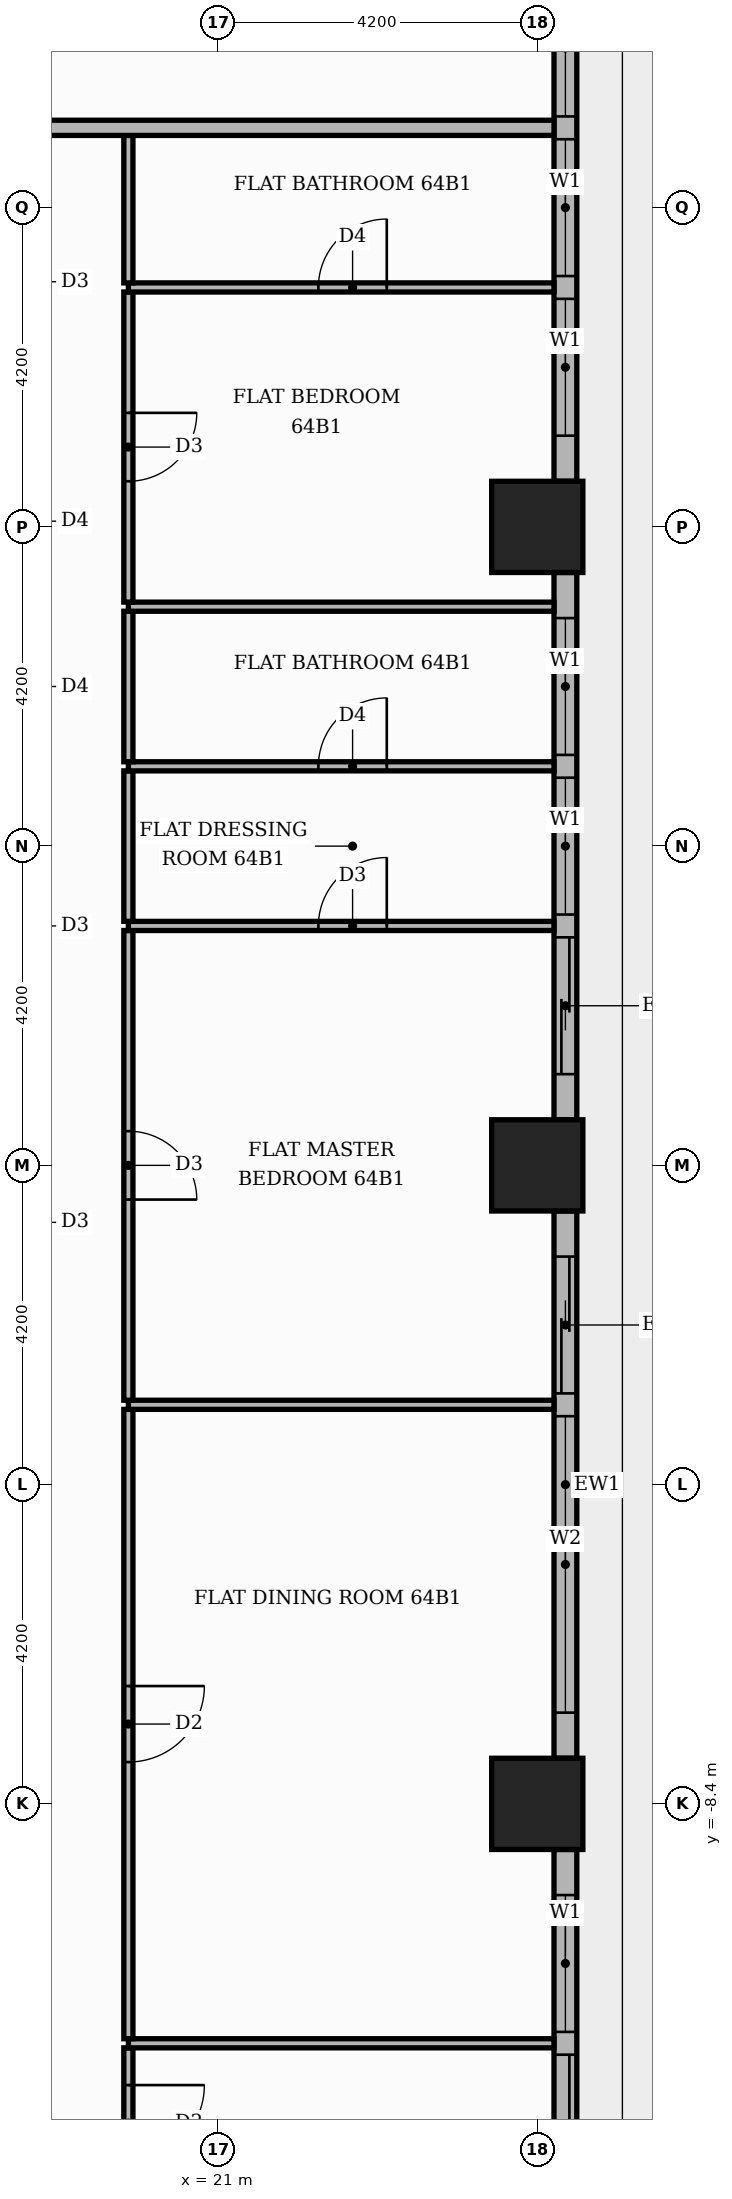
"""IFC4 building model, lengths in metres.
Left out: names, types, materials, properties, quantities, classifications, styles, units other than length and angle.
Written with IfcOpenShell. Run it as: python <this file> out.ifc"""

import sys

from ifc_helpers import new_model, si_unit, direction, frame, frame_2d, origin, origin_2d, place, context, subcontext, project, spatial, rectangle, extrude, element, fill, save


model = new_model("IFC4")
c1 = context("Model", 3, precision=1e-05, world=origin(), true_north=direction((0.0, 1.0)))
c2 = subcontext(c1, "Body", "Model", "MODEL_VIEW")
j1 = project(units=[si_unit("LENGTHUNIT", "METRE"), si_unit("PLANEANGLEUNIT", "RADIAN")], contexts=[c1])
p1 = place(None, origin())
s1 = spatial("IfcSite", under=j1, at=p1, CompositionType="ELEMENT")
p2 = place(p1, origin())
s2 = spatial("IfcBuilding", under=s1, at=p2, CompositionType="ELEMENT")
p3 = place(p2, frame((0.0, 0.0, 267.9)))
s3 = spatial("IfcBuildingStorey", under=s2, at=p3, CompositionType="ELEMENT", Elevation=267.9)
for number, where, z_axis, x_axis in (
    (1, (25.2, 0.0, 0.0), (0.0, 0.0, 1.0), (1.0, 0.0, 0.0)),
    (2, (25.2, 8.4, 0.0), (0.0, 0.0, 1.0), (1.0, 0.0, 0.0)),
    (3, (25.2, -8.4, 0.0), (0.0, 0.0, 1.0), (1.0, 0.0, 0.0)),
):
    element("IfcColumn", number, at=place(p3, frame(where, z_axis=z_axis, x_axis=x_axis)), inside=s3, PredefinedType="COLUMN", context=c2, shape_type="SweptSolid", body=[
        extrude(rectangle(XDim=1.2, YDim=1.2, at=origin_2d()), origin(), (0.0, 0.0, 1.0), 3.9),
    ])
p4 = place(p3, frame((25.57, -16.2, 0.0), z_axis=(0.0, 0.0, 1.0), x_axis=(0.0, 1.0, 0.0)))
e4 = element("IfcWall", 4, at=p4, inside=s3, PredefinedType="STANDARD", context=c2, shape_type="SweptSolid", body=[
    extrude(rectangle(XDim=7.2, YDim=0.3, at=frame_2d((3.6, 0.0))), origin(), (0.0, 0.0, 1.0), 3.48),
])
p5 = place(p4, frame((0.6, 0.0, 0.0)))
e5 = element("IfcOpeningElement", 5, at=p5, cuts=e4, PredefinedType="OPENING", context=c2, shape_type="SweptSolid", body=[
    extrude(rectangle(XDim=3.9, YDim=2.4, at=frame_2d((1.95, 1.2))), frame((0.0, 0.16, 0.0), z_axis=(0.0, -1.0, 0.0), x_axis=(1.0, 0.0, 0.0)), (0.0, 0.0, 1.0), 0.32),
])
p6 = place(p4, frame((4.8, 0.0, 0.9)))
e6 = element("IfcOpeningElement", 6, at=p6, cuts=e4, PredefinedType="OPENING", context=c2, shape_type="SweptSolid", body=[
    extrude(rectangle(XDim=1.8, YDim=2.1, at=frame_2d((0.9, 1.05))), frame((0.0, 0.16, 0.0), z_axis=(0.0, -1.0, 0.0), x_axis=(1.0, 0.0, 0.0)), (0.0, 0.0, 1.0), 0.32),
])
p7 = place(p3, frame((25.57, -7.8, 0.0), z_axis=(0.0, 0.0, 1.0), x_axis=(0.0, 1.0, 0.0)))
e7 = element("IfcWall", 7, at=p7, inside=s3, PredefinedType="STANDARD", context=c2, shape_type="SweptSolid", body=[
    extrude(rectangle(XDim=7.2, YDim=0.3, at=frame_2d((3.6, 0.0))), origin(), (0.0, 0.0, 1.0), 3.48),
])
p8 = place(p7, frame((0.6, 0.0, 0.9)))
e8 = element("IfcOpeningElement", 8, at=p8, cuts=e7, PredefinedType="OPENING", context=c2, shape_type="SweptSolid", body=[
    extrude(rectangle(XDim=3.9, YDim=2.1, at=frame_2d((1.95, 1.05))), frame((0.0, 0.16, 0.0), z_axis=(0.0, -1.0, 0.0), x_axis=(1.0, 0.0, 0.0)), (0.0, 0.0, 1.0), 0.32),
])
p9 = place(p7, frame((4.8, 0.0, 0.0)))
e9 = element("IfcOpeningElement", 9, at=p9, cuts=e7, PredefinedType="OPENING", context=c2, shape_type="SweptSolid", body=[
    extrude(rectangle(XDim=1.8, YDim=2.4, at=frame_2d((0.9, 1.2))), frame((0.0, 0.16, 0.0), z_axis=(0.0, -1.0, 0.0), x_axis=(1.0, 0.0, 0.0)), (0.0, 0.0, 1.0), 0.32),
])
p10 = place(p3, frame((25.57, 0.6, 0.0), z_axis=(0.0, 0.0, 1.0), x_axis=(0.0, 1.0, 0.0)))
e10 = element("IfcWall", 10, at=p10, inside=s3, PredefinedType="STANDARD", context=c2, shape_type="SweptSolid", body=[
    extrude(rectangle(XDim=7.2, YDim=0.3, at=frame_2d((3.6, 0.0))), origin(), (0.0, 0.0, 1.0), 3.48),
])
p11 = place(p10, frame((0.6, 0.0, 0.0)))
e11 = element("IfcOpeningElement", 11, at=p11, cuts=e10, PredefinedType="OPENING", context=c2, shape_type="SweptSolid", body=[
    extrude(rectangle(XDim=1.8, YDim=2.4, at=frame_2d((0.9, 1.2))), frame((0.0, 0.16, 0.0), z_axis=(0.0, -1.0, 0.0), x_axis=(1.0, 0.0, 0.0)), (0.0, 0.0, 1.0), 0.32),
])
p12 = place(p10, frame((2.7, 0.0, 0.9)))
e12 = element("IfcOpeningElement", 12, at=p12, cuts=e10, PredefinedType="OPENING", context=c2, shape_type="SweptSolid", body=[
    extrude(rectangle(XDim=1.8, YDim=2.1, at=frame_2d((0.9, 1.05))), frame((0.0, 0.16, 0.0), z_axis=(0.0, -1.0, 0.0), x_axis=(1.0, 0.0, 0.0)), (0.0, 0.0, 1.0), 0.32),
])
p13 = place(p10, frame((4.8, 0.0, 0.9)))
e13 = element("IfcOpeningElement", 13, at=p13, cuts=e10, PredefinedType="OPENING", context=c2, shape_type="SweptSolid", body=[
    extrude(rectangle(XDim=1.8, YDim=2.1, at=frame_2d((0.9, 1.05))), frame((0.0, 0.16, 0.0), z_axis=(0.0, -1.0, 0.0), x_axis=(1.0, 0.0, 0.0)), (0.0, 0.0, 1.0), 0.32),
])
p14 = place(p3, frame((25.57, 9.0, 0.0), z_axis=(0.0, 0.0, 1.0), x_axis=(0.0, 1.0, 0.0)))
e14 = element("IfcWall", 14, at=p14, inside=s3, PredefinedType="STANDARD", context=c2, shape_type="SweptSolid", body=[
    extrude(rectangle(XDim=7.2, YDim=0.3, at=frame_2d((3.6, 0.0))), origin(), (0.0, 0.0, 1.0), 3.48),
])
p15 = place(p14, frame((0.6, 0.0, 0.9)))
e15 = element("IfcOpeningElement", 15, at=p15, cuts=e14, PredefinedType="OPENING", context=c2, shape_type="SweptSolid", body=[
    extrude(rectangle(XDim=1.8, YDim=2.1, at=frame_2d((0.9, 1.05))), frame((0.0, 0.16, 0.0), z_axis=(0.0, -1.0, 0.0), x_axis=(1.0, 0.0, 0.0)), (0.0, 0.0, 1.0), 0.32),
])
p16 = place(p14, frame((2.7, 0.0, 0.9)))
e16 = element("IfcOpeningElement", 16, at=p16, cuts=e14, PredefinedType="OPENING", context=c2, shape_type="SweptSolid", body=[
    extrude(rectangle(XDim=1.8, YDim=2.1, at=frame_2d((0.9, 1.05))), frame((0.0, 0.16, 0.0), z_axis=(0.0, -1.0, 0.0), x_axis=(1.0, 0.0, 0.0)), (0.0, 0.0, 1.0), 0.32),
])
p17 = place(p14, frame((4.8, 0.0, 0.9)))
e17 = element("IfcOpeningElement", 17, at=p17, cuts=e14, PredefinedType="OPENING", context=c2, shape_type="SweptSolid", body=[
    extrude(rectangle(XDim=1.8, YDim=2.1, at=frame_2d((0.9, 1.05))), frame((0.0, 0.16, 0.0), z_axis=(0.0, -1.0, 0.0), x_axis=(1.0, 0.0, 0.0)), (0.0, 0.0, 1.0), 0.32),
])
p18 = place(p3, frame((19.82, -13.59, 0.0), z_axis=(0.0, 0.0, 1.0), x_axis=(0.0, 1.0, 0.0)))
e18 = element("IfcWall", 18, at=p18, inside=s3, PredefinedType="PARTITIONING", context=c2, shape_type="SweptSolid", body=[
    extrude(rectangle(XDim=1.98, YDim=0.12, at=frame_2d((0.99, 0.0))), origin(), (0.0, 0.0, 1.0), 3.48),
])
p19 = place(p18, frame((0.49, 0.0, 0.0)))
e19 = element("IfcOpeningElement", 19, at=p19, cuts=e18, PredefinedType="OPENING", context=c2, shape_type="SweptSolid", body=[
    extrude(rectangle(XDim=1.0, YDim=2.1, at=frame_2d((0.5, 1.05))), frame((0.0, 0.07, 0.0), z_axis=(0.0, -1.0, 0.0), x_axis=(1.0, 0.0, 0.0)), (0.0, 0.0, 1.0), 0.14),
])
p20 = place(p3, frame((19.82, -11.55, 0.0), z_axis=(0.0, 0.0, 1.0), x_axis=(1.0, 0.0, 0.0)))
e20 = element("IfcWall", 20, at=p20, inside=s3, PredefinedType="PARTITIONING", context=c2, shape_type="SweptSolid", body=[
    extrude(rectangle(XDim=5.6, YDim=0.12, at=frame_2d((2.8, 0.0))), origin(), (0.0, 0.0, 1.0), 3.48),
])
p21 = place(p3, frame((19.82, -11.49, 0.0), z_axis=(0.0, 0.0, 1.0), x_axis=(0.0, 1.0, 0.0)))
e21 = element("IfcWall", 21, at=p21, inside=s3, PredefinedType="PARTITIONING", context=c2, shape_type="SweptSolid", body=[
    extrude(rectangle(XDim=8.28, YDim=0.12, at=frame_2d((4.14, 0.0))), origin(), (0.0, 0.0, 1.0), 3.48),
])
p22 = place(p21, frame((3.64, 0.0, 0.0)))
e22 = element("IfcOpeningElement", 22, at=p22, cuts=e21, PredefinedType="OPENING", context=c2, shape_type="SweptSolid", body=[
    extrude(rectangle(XDim=1.0, YDim=2.1, at=frame_2d((0.5, 1.05))), frame((0.0, 0.07, 0.0), z_axis=(0.0, -1.0, 0.0), x_axis=(1.0, 0.0, 0.0)), (0.0, 0.0, 1.0), 0.14),
])
p23 = place(p3, frame((19.82, -3.15, 0.0), z_axis=(0.0, 0.0, 1.0), x_axis=(1.0, 0.0, 0.0)))
e23 = element("IfcWall", 23, at=p23, inside=s3, PredefinedType="PARTITIONING", context=c2, shape_type="SweptSolid", body=[
    extrude(rectangle(XDim=5.6, YDim=0.12, at=frame_2d((2.8, 0.0))), origin(), (0.0, 0.0, 1.0), 3.48),
])
p24 = place(p3, frame((19.82, -3.09, 0.0), z_axis=(0.0, 0.0, 1.0), x_axis=(0.0, 1.0, 0.0)))
e24 = element("IfcWall", 24, at=p24, inside=s3, PredefinedType="PARTITIONING", context=c2, shape_type="SweptSolid", body=[
    extrude(rectangle(XDim=6.18, YDim=0.12, at=frame_2d((3.09, 0.0))), origin(), (0.0, 0.0, 1.0), 3.48),
])
p25 = place(p24, frame((2.64, 0.0, 0.0)))
e25 = element("IfcOpeningElement", 25, at=p25, cuts=e24, PredefinedType="OPENING", context=c2, shape_type="SweptSolid", body=[
    extrude(rectangle(XDim=0.9, YDim=2.1, at=frame_2d((0.45, 1.05))), frame((0.0, 0.07, 0.0), z_axis=(0.0, -1.0, 0.0), x_axis=(1.0, 0.0, 0.0)), (0.0, 0.0, 1.0), 0.14),
])
p26 = place(p3, frame((19.82, 3.15, 0.0), z_axis=(0.0, 0.0, 1.0), x_axis=(1.0, 0.0, 0.0)))
e26 = element("IfcWall", 26, at=p26, inside=s3, PredefinedType="PARTITIONING", context=c2, shape_type="SweptSolid", body=[
    extrude(rectangle(XDim=5.6, YDim=0.12, at=frame_2d((2.8, 0.0))), origin(), (0.0, 0.0, 1.0), 3.48),
])
p27 = place(p26, frame((2.5, 0.0, 0.0)))
e27 = element("IfcOpeningElement", 27, at=p27, cuts=e26, PredefinedType="OPENING", context=c2, shape_type="SweptSolid", body=[
    extrude(rectangle(XDim=0.9, YDim=2.1, at=frame_2d((0.45, 1.05))), frame((0.0, 0.07, 0.0), z_axis=(0.0, -1.0, 0.0), x_axis=(1.0, 0.0, 0.0)), (0.0, 0.0, 1.0), 0.14),
])
p28 = place(p3, frame((19.82, 3.21, 0.0), z_axis=(0.0, 0.0, 1.0), x_axis=(0.0, 1.0, 0.0)))
e28 = element("IfcWall", 28, at=p28, inside=s3, PredefinedType="PARTITIONING", context=c2, shape_type="SweptSolid", body=[
    extrude(rectangle(XDim=1.98, YDim=0.12, at=frame_2d((0.99, 0.0))), origin(), (0.0, 0.0, 1.0), 3.48),
])
p29 = place(p3, frame((19.82, 5.25, 0.0), z_axis=(0.0, 0.0, 1.0), x_axis=(1.0, 0.0, 0.0)))
e29 = element("IfcWall", 29, at=p29, inside=s3, PredefinedType="PARTITIONING", context=c2, shape_type="SweptSolid", body=[
    extrude(rectangle(XDim=5.6, YDim=0.12, at=frame_2d((2.8, 0.0))), origin(), (0.0, 0.0, 1.0), 3.48),
])
p30 = place(p29, frame((2.5, 0.0, 0.0)))
e30 = element("IfcOpeningElement", 30, at=p30, cuts=e29, PredefinedType="OPENING", context=c2, shape_type="SweptSolid", body=[
    extrude(rectangle(XDim=0.9, YDim=2.1, at=frame_2d((0.45, 1.05))), frame((0.0, 0.07, 0.0), z_axis=(0.0, -1.0, 0.0), x_axis=(1.0, 0.0, 0.0)), (0.0, 0.0, 1.0), 0.14),
])
p31 = place(p3, frame((19.82, 5.31, 0.0), z_axis=(0.0, 0.0, 1.0), x_axis=(0.0, 1.0, 0.0)))
e31 = element("IfcWall", 31, at=p31, inside=s3, PredefinedType="PARTITIONING", context=c2, shape_type="SweptSolid", body=[
    extrude(rectangle(XDim=1.98, YDim=0.12, at=frame_2d((0.99, 0.0))), origin(), (0.0, 0.0, 1.0), 3.48),
])
p32 = place(p3, frame((19.82, 7.35, 0.0), z_axis=(0.0, 0.0, 1.0), x_axis=(1.0, 0.0, 0.0)))
e32 = element("IfcWall", 32, at=p32, inside=s3, PredefinedType="PARTITIONING", context=c2, shape_type="SweptSolid", body=[
    extrude(rectangle(XDim=5.6, YDim=0.12, at=frame_2d((2.8, 0.0))), origin(), (0.0, 0.0, 1.0), 3.48),
])
p33 = place(p3, frame((19.82, 7.41, 0.0), z_axis=(0.0, 0.0, 1.0), x_axis=(0.0, 1.0, 0.0)))
e33 = element("IfcWall", 33, at=p33, inside=s3, PredefinedType="PARTITIONING", context=c2, shape_type="SweptSolid", body=[
    extrude(rectangle(XDim=4.08, YDim=0.12, at=frame_2d((2.04, 0.0))), origin(), (0.0, 0.0, 1.0), 3.48),
])
p34 = place(p33, frame((1.59, 0.0, 0.0)))
e34 = element("IfcOpeningElement", 34, at=p34, cuts=e33, PredefinedType="OPENING", context=c2, shape_type="SweptSolid", body=[
    extrude(rectangle(XDim=0.9, YDim=2.1, at=frame_2d((0.45, 1.05))), frame((0.0, 0.07, 0.0), z_axis=(0.0, -1.0, 0.0), x_axis=(1.0, 0.0, 0.0)), (0.0, 0.0, 1.0), 0.14),
])
p35 = place(p3, frame((19.82, 11.55, 0.0), z_axis=(0.0, 0.0, 1.0), x_axis=(1.0, 0.0, 0.0)))
e35 = element("IfcWall", 35, at=p35, inside=s3, PredefinedType="PARTITIONING", context=c2, shape_type="SweptSolid", body=[
    extrude(rectangle(XDim=5.6, YDim=0.12, at=frame_2d((2.8, 0.0))), origin(), (0.0, 0.0, 1.0), 3.48),
])
p36 = place(p35, frame((2.5, 0.0, 0.0)))
e36 = element("IfcOpeningElement", 36, at=p36, cuts=e35, PredefinedType="OPENING", context=c2, shape_type="SweptSolid", body=[
    extrude(rectangle(XDim=0.9, YDim=2.1, at=frame_2d((0.45, 1.05))), frame((0.0, 0.07, 0.0), z_axis=(0.0, -1.0, 0.0), x_axis=(1.0, 0.0, 0.0)), (0.0, 0.0, 1.0), 0.14),
])
p37 = place(p3, frame((19.82, 11.61, 0.0), z_axis=(0.0, 0.0, 1.0), x_axis=(0.0, 1.0, 0.0)))
e37 = element("IfcWall", 37, at=p37, inside=s3, PredefinedType="PARTITIONING", context=c2, shape_type="SweptSolid", body=[
    extrude(rectangle(XDim=1.94, YDim=0.12, at=frame_2d((0.97, 0.0))), origin(), (0.0, 0.0, 1.0), 3.48),
])
p38 = place(p3, frame((-13.65, 13.65, 0.0), z_axis=(0.0, 0.0, 1.0), x_axis=(1.0, 0.0, 0.0)))
e38 = element("IfcWall", 38, at=p38, inside=s3, PredefinedType="PARTITIONING", context=c2, shape_type="SweptSolid", body=[
    extrude(rectangle(XDim=39.07, YDim=0.2, at=frame_2d((19.535, 0.0))), origin(), (0.0, 0.0, 1.0), 3.48),
])
p39 = place(p38, frame((24.65, 0.0, 0.0)))
e39 = element("IfcOpeningElement", 39, at=p39, cuts=e38, PredefinedType="OPENING", context=c2, shape_type="SweptSolid", body=[
    extrude(rectangle(XDim=1.1, YDim=2.4, at=frame_2d((0.55, 1.2))), frame((0.0, 0.11, 0.0), z_axis=(0.0, -1.0, 0.0), x_axis=(1.0, 0.0, 0.0)), (0.0, 0.0, 1.0), 0.22),
])
p40 = place(p5, origin())
e40 = element("IfcDoor", 40, at=p40, inside=s3, OperationType="SLIDING_TO_LEFT", PredefinedType="DOOR", context=c2, shape_type="SweptSolid", body=[
    extrude(rectangle(XDim=3.9, YDim=2.4, at=frame_2d((1.95, 1.2))), frame((0.0, 0.025, 0.0), z_axis=(0.0, -1.0, 0.0), x_axis=(1.0, 0.0, 0.0)), (0.0, 0.0, 1.0), 0.05),
])
fill(e5, e40)
p41 = place(p6, origin())
e41 = element("IfcWindow", 41, at=p41, inside=s3, PartitioningType="SINGLE_PANEL", PredefinedType="WINDOW", context=c2, shape_type="SweptSolid", body=[
    extrude(rectangle(XDim=1.8, YDim=2.1, at=frame_2d((0.9, 1.05))), frame((0.0, 0.03, 0.0), z_axis=(0.0, -1.0, 0.0), x_axis=(1.0, 0.0, 0.0)), (0.0, 0.0, 1.0), 0.06),
])
fill(e6, e41)
p42 = place(p8, origin())
e42 = element("IfcWindow", 42, at=p42, inside=s3, PartitioningType="SINGLE_PANEL", PredefinedType="WINDOW", context=c2, shape_type="SweptSolid", body=[
    extrude(rectangle(XDim=3.9, YDim=2.1, at=frame_2d((1.95, 1.05))), frame((0.0, 0.03, 0.0), z_axis=(0.0, -1.0, 0.0), x_axis=(1.0, 0.0, 0.0)), (0.0, 0.0, 1.0), 0.06),
])
fill(e8, e42)
p43 = place(p9, origin())
e43 = element("IfcDoor", 43, at=p43, inside=s3, OperationType="SLIDING_TO_RIGHT", PredefinedType="DOOR", context=c2, shape_type="SweptSolid", body=[
    extrude(rectangle(XDim=1.8, YDim=2.4, at=frame_2d((0.9, 1.2))), frame((0.0, 0.025, 0.0), z_axis=(0.0, -1.0, 0.0), x_axis=(1.0, 0.0, 0.0)), (0.0, 0.0, 1.0), 0.05),
])
fill(e9, e43)
p44 = place(p11, origin())
e44 = element("IfcDoor", 44, at=p44, inside=s3, OperationType="SLIDING_TO_LEFT", PredefinedType="DOOR", context=c2, shape_type="SweptSolid", body=[
    extrude(rectangle(XDim=1.8, YDim=2.4, at=frame_2d((0.9, 1.2))), frame((0.0, 0.025, 0.0), z_axis=(0.0, -1.0, 0.0), x_axis=(1.0, 0.0, 0.0)), (0.0, 0.0, 1.0), 0.05),
])
fill(e11, e44)
p45 = place(p12, origin())
e45 = element("IfcWindow", 45, at=p45, inside=s3, PartitioningType="SINGLE_PANEL", PredefinedType="WINDOW", context=c2, shape_type="SweptSolid", body=[
    extrude(rectangle(XDim=1.8, YDim=2.1, at=frame_2d((0.9, 1.05))), frame((0.0, 0.03, 0.0), z_axis=(0.0, -1.0, 0.0), x_axis=(1.0, 0.0, 0.0)), (0.0, 0.0, 1.0), 0.06),
])
fill(e12, e45)
p46 = place(p13, origin())
e46 = element("IfcWindow", 46, at=p46, inside=s3, PartitioningType="SINGLE_PANEL", PredefinedType="WINDOW", context=c2, shape_type="SweptSolid", body=[
    extrude(rectangle(XDim=1.8, YDim=2.1, at=frame_2d((0.9, 1.05))), frame((0.0, 0.03, 0.0), z_axis=(0.0, -1.0, 0.0), x_axis=(1.0, 0.0, 0.0)), (0.0, 0.0, 1.0), 0.06),
])
fill(e13, e46)
p47 = place(p15, origin())
e47 = element("IfcWindow", 47, at=p47, inside=s3, PartitioningType="SINGLE_PANEL", PredefinedType="WINDOW", context=c2, shape_type="SweptSolid", body=[
    extrude(rectangle(XDim=1.8, YDim=2.1, at=frame_2d((0.9, 1.05))), frame((0.0, 0.03, 0.0), z_axis=(0.0, -1.0, 0.0), x_axis=(1.0, 0.0, 0.0)), (0.0, 0.0, 1.0), 0.06),
])
fill(e15, e47)
p48 = place(p16, origin())
e48 = element("IfcWindow", 48, at=p48, inside=s3, PartitioningType="SINGLE_PANEL", PredefinedType="WINDOW", context=c2, shape_type="SweptSolid", body=[
    extrude(rectangle(XDim=1.8, YDim=2.1, at=frame_2d((0.9, 1.05))), frame((0.0, 0.03, 0.0), z_axis=(0.0, -1.0, 0.0), x_axis=(1.0, 0.0, 0.0)), (0.0, 0.0, 1.0), 0.06),
])
fill(e16, e48)
p49 = place(p17, origin())
e49 = element("IfcWindow", 49, at=p49, inside=s3, PartitioningType="SINGLE_PANEL", PredefinedType="WINDOW", context=c2, shape_type="SweptSolid", body=[
    extrude(rectangle(XDim=1.8, YDim=2.1, at=frame_2d((0.9, 1.05))), frame((0.0, 0.03, 0.0), z_axis=(0.0, -1.0, 0.0), x_axis=(1.0, 0.0, 0.0)), (0.0, 0.0, 1.0), 0.06),
])
fill(e17, e49)
p50 = place(p19, frame((1.0, 0.0, 0.0), z_axis=(0.0, 0.0, 1.0), x_axis=(-1.0, 0.0, 0.0)))
e50 = element("IfcDoor", 50, at=p50, inside=s3, OperationType="SINGLE_SWING_RIGHT", PredefinedType="DOOR", context=c2, shape_type="SweptSolid", body=[
    extrude(rectangle(XDim=1.0, YDim=2.1, at=frame_2d((0.5, 1.05))), frame((0.0, 0.025, 0.0), z_axis=(0.0, -1.0, 0.0), x_axis=(1.0, 0.0, 0.0)), (0.0, 0.0, 1.0), 0.05),
])
fill(e19, e50)
p51 = place(p22, frame((1.0, 0.0, 0.0), z_axis=(0.0, 0.0, 1.0), x_axis=(-1.0, 0.0, 0.0)))
e51 = element("IfcDoor", 51, at=p51, inside=s3, OperationType="SINGLE_SWING_RIGHT", PredefinedType="DOOR", context=c2, shape_type="SweptSolid", body=[
    extrude(rectangle(XDim=1.0, YDim=2.1, at=frame_2d((0.5, 1.05))), frame((0.0, 0.025, 0.0), z_axis=(0.0, -1.0, 0.0), x_axis=(1.0, 0.0, 0.0)), (0.0, 0.0, 1.0), 0.05),
])
fill(e22, e51)
p52 = place(p25, frame((0.9, 0.0, 0.0), z_axis=(0.0, 0.0, 1.0), x_axis=(-1.0, 0.0, 0.0)))
e52 = element("IfcDoor", 52, at=p52, inside=s3, OperationType="SINGLE_SWING_LEFT", PredefinedType="DOOR", context=c2, shape_type="SweptSolid", body=[
    extrude(rectangle(XDim=0.9, YDim=2.1, at=frame_2d((0.45, 1.05))), frame((0.0, 0.025, 0.0), z_axis=(0.0, -1.0, 0.0), x_axis=(1.0, 0.0, 0.0)), (0.0, 0.0, 1.0), 0.05),
])
fill(e25, e52)
p53 = place(p27, origin())
e53 = element("IfcDoor", 53, at=p53, inside=s3, OperationType="SINGLE_SWING_RIGHT", PredefinedType="DOOR", context=c2, shape_type="SweptSolid", body=[
    extrude(rectangle(XDim=0.9, YDim=2.1, at=frame_2d((0.45, 1.05))), frame((0.0, 0.025, 0.0), z_axis=(0.0, -1.0, 0.0), x_axis=(1.0, 0.0, 0.0)), (0.0, 0.0, 1.0), 0.05),
])
fill(e27, e53)
p54 = place(p30, origin())
e54 = element("IfcDoor", 54, at=p54, inside=s3, OperationType="SINGLE_SWING_RIGHT", PredefinedType="DOOR", context=c2, shape_type="SweptSolid", body=[
    extrude(rectangle(XDim=0.9, YDim=2.1, at=frame_2d((0.45, 1.05))), frame((0.0, 0.025, 0.0), z_axis=(0.0, -1.0, 0.0), x_axis=(1.0, 0.0, 0.0)), (0.0, 0.0, 1.0), 0.05),
])
fill(e30, e54)
p55 = place(p34, frame((0.9, 0.0, 0.0), z_axis=(0.0, 0.0, 1.0), x_axis=(-1.0, 0.0, 0.0)))
e55 = element("IfcDoor", 55, at=p55, inside=s3, OperationType="SINGLE_SWING_RIGHT", PredefinedType="DOOR", context=c2, shape_type="SweptSolid", body=[
    extrude(rectangle(XDim=0.9, YDim=2.1, at=frame_2d((0.45, 1.05))), frame((0.0, 0.025, 0.0), z_axis=(0.0, -1.0, 0.0), x_axis=(1.0, 0.0, 0.0)), (0.0, 0.0, 1.0), 0.05),
])
fill(e34, e55)
p56 = place(p36, origin())
e56 = element("IfcDoor", 56, at=p56, inside=s3, OperationType="SINGLE_SWING_RIGHT", PredefinedType="DOOR", context=c2, shape_type="SweptSolid", body=[
    extrude(rectangle(XDim=0.9, YDim=2.1, at=frame_2d((0.45, 1.05))), frame((0.0, 0.025, 0.0), z_axis=(0.0, -1.0, 0.0), x_axis=(1.0, 0.0, 0.0)), (0.0, 0.0, 1.0), 0.05),
])
fill(e36, e56)
save(model, sys.argv[1])
